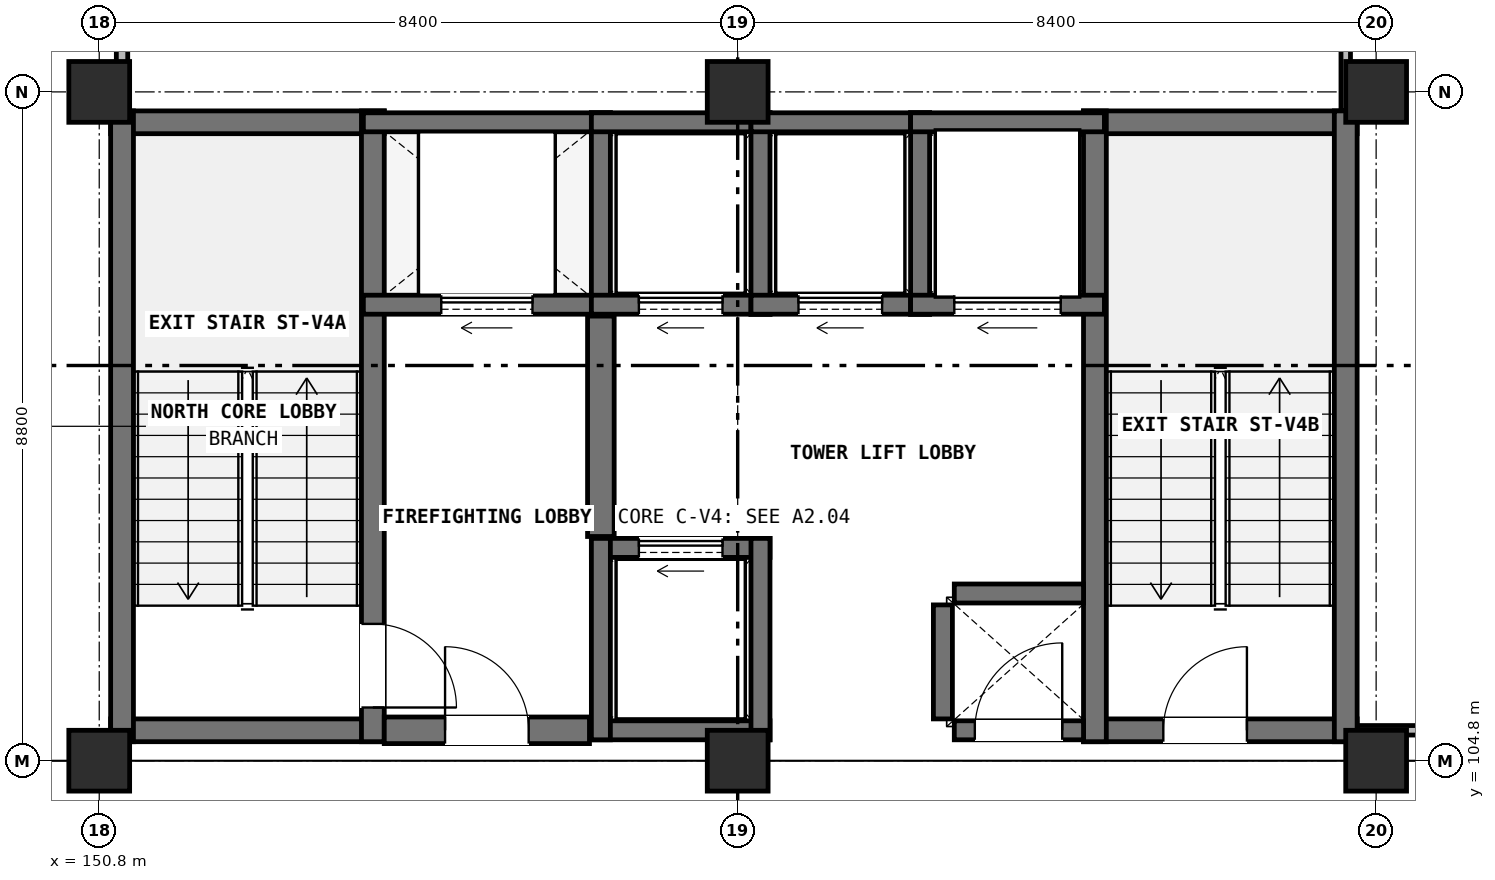
"""IFC4 building model, lengths in metres.
Left out: names, types, materials, properties, quantities, classifications, styles, units other than length and angle.
Written with IfcOpenShell. Run it as: python <this file> out.ifc"""

import sys

from ifc_helpers import new_model, si_unit, direction, frame, frame_2d, origin, origin_2d, place, context, subcontext, project, spatial, rectangle, extrude, element, fill, save


model = new_model("IFC4")
c1 = context("Model", 3, precision=1e-05, world=origin(), true_north=direction((0.0, 1.0)))
c2 = subcontext(c1, "Body", "Model", "MODEL_VIEW")
j1 = project(units=[si_unit("LENGTHUNIT", "METRE"), si_unit("PLANEANGLEUNIT", "RADIAN")], contexts=[c1])
p1 = place(None, origin())
s1 = spatial("IfcSite", under=j1, at=p1, CompositionType="ELEMENT")
p2 = place(p1, origin())
s2 = spatial("IfcBuilding", under=s1, at=p2, CompositionType="ELEMENT")
p3 = place(p2, frame((0.0, 0.0, 13.2)))
s3 = spatial("IfcBuildingStorey", under=s2, at=p3, CompositionType="ELEMENT", Elevation=13.2)
for number, where, z_axis, x_axis in (
    (1, (150.8, 104.8, 0.0), (0.0, 0.0, 1.0), (1.0, 0.0, 0.0)),
    (2, (150.8, 113.6, 0.0), (0.0, 0.0, 1.0), (1.0, 0.0, 0.0)),
    (3, (159.2, 104.8, 0.0), (0.0, 0.0, 1.0), (1.0, 0.0, 0.0)),
    (4, (159.2, 113.6, 0.0), (0.0, 0.0, 1.0), (1.0, 0.0, 0.0)),
    (5, (167.6, 104.8, 0.0), (0.0, 0.0, 1.0), (1.0, 0.0, 0.0)),
    (6, (167.6, 113.6, 0.0), (0.0, 0.0, 1.0), (1.0, 0.0, 0.0)),
):
    element("IfcColumn", number, at=place(p3, frame(where, z_axis=z_axis, x_axis=x_axis)), inside=s3, PredefinedType="COLUMN", context=c2, shape_type="SweptSolid", body=[
        extrude(rectangle(XDim=0.8, YDim=0.8, at=origin_2d()), origin(), (0.0, 0.0, 1.0), 4.0),
    ])
for number, where, z_axis, x_axis in (
    (7, (150.95, 105.2, 0.0), (0.0, 0.0, 1.0), (1.0, 0.0, 0.0)),
    (8, (150.95, 113.2, 0.0), (0.0, 0.0, 1.0), (1.0, 0.0, 0.0)),
):
    element("IfcWall", number, at=place(p3, frame(where, z_axis=z_axis, x_axis=x_axis)), inside=s3, PredefinedType="SHEAR", context=c2, shape_type="SweptSolid", body=[
        extrude(rectangle(XDim=3.6, YDim=0.3, at=frame_2d((1.8, 0.0))), origin(), (0.0, 0.0, 1.0), 4.0),
    ])
p4 = place(p3, frame((151.1, 105.05, 0.0), z_axis=(0.0, 0.0, 1.0), x_axis=(0.0, 1.0, 0.0)))
e9 = element("IfcWall", 9, at=p4, inside=s3, PredefinedType="SHEAR", context=c2, shape_type="SweptSolid", body=[
    extrude(rectangle(XDim=8.3, YDim=0.3, at=frame_2d((4.15, 0.0))), origin(), (0.0, 0.0, 1.0), 4.0),
])
p5 = place(p3, frame((154.4, 105.05, 0.0), z_axis=(0.0, 0.0, 1.0), x_axis=(0.0, 1.0, 0.0)))
e10 = element("IfcWall", 10, at=p5, inside=s3, PredefinedType="SHEAR", context=c2, shape_type="SweptSolid", body=[
    extrude(rectangle(XDim=8.3, YDim=0.3, at=frame_2d((4.15, 0.0))), origin(), (0.0, 0.0, 1.0), 4.0),
])
p6 = place(p5, frame((0.45, 0.0, 0.0)))
e11 = element("IfcOpeningElement", 11, at=p6, cuts=e10, PredefinedType="OPENING", context=c2, shape_type="SweptSolid", body=[
    extrude(rectangle(XDim=1.1, YDim=2.2, at=frame_2d((0.55, 1.1))), frame((0.0, 0.16, 0.0), z_axis=(0.0, -1.0, 0.0), x_axis=(1.0, 0.0, 0.0)), (0.0, 0.0, 1.0), 0.32),
])
p7 = place(p3, frame((163.75, 105.2, 0.0), z_axis=(0.0, 0.0, 1.0), x_axis=(1.0, 0.0, 0.0)))
e12 = element("IfcWall", 12, at=p7, inside=s3, PredefinedType="SHEAR", context=c2, shape_type="SweptSolid", body=[
    extrude(rectangle(XDim=3.6, YDim=0.3, at=frame_2d((1.8, 0.0))), origin(), (0.0, 0.0, 1.0), 4.0),
])
p8 = place(p7, frame((1.05, 0.0, 0.0)))
e13 = element("IfcOpeningElement", 13, at=p8, cuts=e12, PredefinedType="OPENING", context=c2, shape_type="SweptSolid", body=[
    extrude(rectangle(XDim=1.1, YDim=2.2, at=frame_2d((0.55, 1.1))), frame((0.0, 0.16, 0.0), z_axis=(0.0, -1.0, 0.0), x_axis=(1.0, 0.0, 0.0)), (0.0, 0.0, 1.0), 0.32),
])
p9 = place(p3, frame((163.75, 113.2, 0.0), z_axis=(0.0, 0.0, 1.0), x_axis=(1.0, 0.0, 0.0)))
e14 = element("IfcWall", 14, at=p9, inside=s3, PredefinedType="SHEAR", context=c2, shape_type="SweptSolid", body=[
    extrude(rectangle(XDim=3.6, YDim=0.3, at=frame_2d((1.8, 0.0))), origin(), (0.0, 0.0, 1.0), 4.0),
])
for number, where, z_axis, x_axis in (
    (15, (163.9, 105.05, 0.0), (0.0, 0.0, 1.0), (0.0, 1.0, 0.0)),
    (16, (167.2, 105.05, 0.0), (0.0, 0.0, 1.0), (0.0, 1.0, 0.0)),
):
    element("IfcWall", number, at=place(p3, frame(where, z_axis=z_axis, x_axis=x_axis)), inside=s3, PredefinedType="SHEAR", context=c2, shape_type="SweptSolid", body=[
        extrude(rectangle(XDim=8.3, YDim=0.3, at=frame_2d((4.15, 0.0))), origin(), (0.0, 0.0, 1.0), 4.0),
    ])
p10 = place(p3, frame((154.275, 110.8, 0.0), z_axis=(0.0, 0.0, 1.0), x_axis=(1.0, 0.0, 0.0)))
e17 = element("IfcWall", 17, at=p10, inside=s3, PredefinedType="SOLIDWALL", context=c2, shape_type="SweptSolid", body=[
    extrude(rectangle(XDim=3.25, YDim=0.25, at=frame_2d((1.625, 0.0))), origin(), (0.0, 0.0, 1.0), 3.68),
])
p11 = place(p10, frame((1.025, 0.0, 0.0)))
e18 = element("IfcOpeningElement", 18, at=p11, cuts=e17, PredefinedType="OPENING", context=c2, shape_type="SweptSolid", body=[
    extrude(rectangle(XDim=1.2, YDim=2.2, at=frame_2d((0.6, 1.1))), frame((0.0, 0.135, 0.0), z_axis=(0.0, -1.0, 0.0), x_axis=(1.0, 0.0, 0.0)), (0.0, 0.0, 1.0), 0.27),
])
p12 = place(p3, frame((154.275, 113.2, 0.0), z_axis=(0.0, 0.0, 1.0), x_axis=(1.0, 0.0, 0.0)))
e19 = element("IfcWall", 19, at=p12, inside=s3, PredefinedType="SOLIDWALL", context=c2, shape_type="SweptSolid", body=[
    extrude(rectangle(XDim=3.25, YDim=0.25, at=frame_2d((1.625, 0.0))), origin(), (0.0, 0.0, 1.0), 3.68),
])
p13 = place(p3, frame((157.4, 110.675, 0.0), z_axis=(0.0, 0.0, 1.0), x_axis=(0.0, 1.0, 0.0)))
e20 = element("IfcWall", 20, at=p13, inside=s3, PredefinedType="SOLIDWALL", context=c2, shape_type="SweptSolid", body=[
    extrude(rectangle(XDim=2.65, YDim=0.25, at=frame_2d((1.325, 0.0))), origin(), (0.0, 0.0, 1.0), 3.68),
])
p14 = place(p3, frame((157.275, 110.8, 0.0), z_axis=(0.0, 0.0, 1.0), x_axis=(1.0, 0.0, 0.0)))
e21 = element("IfcWall", 21, at=p14, inside=s3, PredefinedType="SOLIDWALL", context=c2, shape_type="SweptSolid", body=[
    extrude(rectangle(XDim=2.35, YDim=0.25, at=frame_2d((1.175, 0.0))), origin(), (0.0, 0.0, 1.0), 3.68),
])
p15 = place(p14, frame((0.625, 0.0, 0.0)))
e22 = element("IfcOpeningElement", 22, at=p15, cuts=e21, PredefinedType="OPENING", context=c2, shape_type="SweptSolid", body=[
    extrude(rectangle(XDim=1.1, YDim=2.2, at=frame_2d((0.55, 1.1))), frame((0.0, 0.135, 0.0), z_axis=(0.0, -1.0, 0.0), x_axis=(1.0, 0.0, 0.0)), (0.0, 0.0, 1.0), 0.27),
])
p16 = place(p3, frame((157.275, 113.2, 0.0), z_axis=(0.0, 0.0, 1.0), x_axis=(1.0, 0.0, 0.0)))
e23 = element("IfcWall", 23, at=p16, inside=s3, PredefinedType="SOLIDWALL", context=c2, shape_type="SweptSolid", body=[
    extrude(rectangle(XDim=2.35, YDim=0.25, at=frame_2d((1.175, 0.0))), origin(), (0.0, 0.0, 1.0), 3.68),
])
p17 = place(p3, frame((159.5, 110.675, 0.0), z_axis=(0.0, 0.0, 1.0), x_axis=(0.0, 1.0, 0.0)))
e24 = element("IfcWall", 24, at=p17, inside=s3, PredefinedType="SOLIDWALL", context=c2, shape_type="SweptSolid", body=[
    extrude(rectangle(XDim=2.65, YDim=0.25, at=frame_2d((1.325, 0.0))), origin(), (0.0, 0.0, 1.0), 3.68),
])
p18 = place(p3, frame((159.375, 110.8, 0.0), z_axis=(0.0, 0.0, 1.0), x_axis=(1.0, 0.0, 0.0)))
e25 = element("IfcWall", 25, at=p18, inside=s3, PredefinedType="SOLIDWALL", context=c2, shape_type="SweptSolid", body=[
    extrude(rectangle(XDim=2.35, YDim=0.25, at=frame_2d((1.175, 0.0))), origin(), (0.0, 0.0, 1.0), 3.68),
])
p19 = place(p18, frame((0.625, 0.0, 0.0)))
e26 = element("IfcOpeningElement", 26, at=p19, cuts=e25, PredefinedType="OPENING", context=c2, shape_type="SweptSolid", body=[
    extrude(rectangle(XDim=1.1, YDim=2.2, at=frame_2d((0.55, 1.1))), frame((0.0, 0.135, 0.0), z_axis=(0.0, -1.0, 0.0), x_axis=(1.0, 0.0, 0.0)), (0.0, 0.0, 1.0), 0.27),
])
p20 = place(p3, frame((159.375, 113.2, 0.0), z_axis=(0.0, 0.0, 1.0), x_axis=(1.0, 0.0, 0.0)))
e27 = element("IfcWall", 27, at=p20, inside=s3, PredefinedType="SOLIDWALL", context=c2, shape_type="SweptSolid", body=[
    extrude(rectangle(XDim=2.35, YDim=0.25, at=frame_2d((1.175, 0.0))), origin(), (0.0, 0.0, 1.0), 3.68),
])
p21 = place(p3, frame((161.6, 110.675, 0.0), z_axis=(0.0, 0.0, 1.0), x_axis=(0.0, 1.0, 0.0)))
e28 = element("IfcWall", 28, at=p21, inside=s3, PredefinedType="SOLIDWALL", context=c2, shape_type="SweptSolid", body=[
    extrude(rectangle(XDim=2.65, YDim=0.25, at=frame_2d((1.325, 0.0))), origin(), (0.0, 0.0, 1.0), 3.68),
])
p22 = place(p3, frame((157.275, 105.2, 0.0), z_axis=(0.0, 0.0, 1.0), x_axis=(1.0, 0.0, 0.0)))
e29 = element("IfcWall", 29, at=p22, inside=s3, PredefinedType="SOLIDWALL", context=c2, shape_type="SweptSolid", body=[
    extrude(rectangle(XDim=2.35, YDim=0.25, at=frame_2d((1.175, 0.0))), origin(), (0.0, 0.0, 1.0), 3.68),
])
p23 = place(p3, frame((157.275, 107.6, 0.0), z_axis=(0.0, 0.0, 1.0), x_axis=(1.0, 0.0, 0.0)))
e30 = element("IfcWall", 30, at=p23, inside=s3, PredefinedType="SOLIDWALL", context=c2, shape_type="SweptSolid", body=[
    extrude(rectangle(XDim=2.35, YDim=0.25, at=frame_2d((1.175, 0.0))), origin(), (0.0, 0.0, 1.0), 3.68),
])
p24 = place(p23, frame((0.625, 0.0, 0.0)))
e31 = element("IfcOpeningElement", 31, at=p24, cuts=e30, PredefinedType="OPENING", context=c2, shape_type="SweptSolid", body=[
    extrude(rectangle(XDim=1.1, YDim=2.2, at=frame_2d((0.55, 1.1))), frame((0.0, 0.135, 0.0), z_axis=(0.0, -1.0, 0.0), x_axis=(1.0, 0.0, 0.0)), (0.0, 0.0, 1.0), 0.27),
])
for number, where, z_axis, x_axis in (
    (32, (157.4, 105.075, 0.0), (0.0, 0.0, 1.0), (0.0, 1.0, 0.0)),
    (33, (159.5, 105.075, 0.0), (0.0, 0.0, 1.0), (0.0, 1.0, 0.0)),
):
    element("IfcWall", number, at=place(p3, frame(where, z_axis=z_axis, x_axis=x_axis)), inside=s3, PredefinedType="SOLIDWALL", context=c2, shape_type="SweptSolid", body=[
        extrude(rectangle(XDim=2.65, YDim=0.25, at=frame_2d((1.325, 0.0))), origin(), (0.0, 0.0, 1.0), 3.68),
    ])
p25 = place(p3, frame((161.475, 110.8, 0.0), z_axis=(0.0, 0.0, 1.0), x_axis=(1.0, 0.0, 0.0)))
e34 = element("IfcWall", 34, at=p25, inside=s3, PredefinedType="SOLIDWALL", context=c2, shape_type="SweptSolid", body=[
    extrude(rectangle(XDim=2.55, YDim=0.25, at=frame_2d((1.275, 0.0))), origin(), (0.0, 0.0, 1.0), 3.68),
])
p26 = place(p25, frame((0.575, 0.0, 0.0)))
e35 = element("IfcOpeningElement", 35, at=p26, cuts=e34, PredefinedType="OPENING", context=c2, shape_type="SweptSolid", body=[
    extrude(rectangle(XDim=1.4, YDim=2.3, at=frame_2d((0.7, 1.15))), frame((0.0, 0.135, 0.0), z_axis=(0.0, -1.0, 0.0), x_axis=(1.0, 0.0, 0.0)), (0.0, 0.0, 1.0), 0.27),
])
p27 = place(p3, frame((161.475, 113.2, 0.0), z_axis=(0.0, 0.0, 1.0), x_axis=(1.0, 0.0, 0.0)))
e36 = element("IfcWall", 36, at=p27, inside=s3, PredefinedType="SOLIDWALL", context=c2, shape_type="SweptSolid", body=[
    extrude(rectangle(XDim=2.55, YDim=0.25, at=frame_2d((1.275, 0.0))), origin(), (0.0, 0.0, 1.0), 3.68),
])
p28 = place(p3, frame((157.4, 107.75, 0.0), z_axis=(0.0, 0.0, 1.0), x_axis=(0.0, 1.0, 0.0)))
e37 = element("IfcWall", 37, at=p28, inside=s3, PredefinedType="SHEAR", context=c2, shape_type="SweptSolid", body=[
    extrude(rectangle(XDim=2.9, YDim=0.35, at=frame_2d((1.45, 0.0))), origin(), (0.0, 0.0, 1.0), 3.68),
])
p29 = place(p3, frame((154.55, 105.2, 0.0), z_axis=(0.0, 0.0, 1.0), x_axis=(1.0, 0.0, 0.0)))
e38 = element("IfcWall", 38, at=p29, inside=s3, PredefinedType="SHEAR", context=c2, shape_type="SweptSolid", body=[
    extrude(rectangle(XDim=2.7, YDim=0.35, at=frame_2d((1.35, 0.0))), origin(), (0.0, 0.0, 1.0), 3.68),
])
p30 = place(p29, frame((0.8, 0.0, 0.0)))
e39 = element("IfcOpeningElement", 39, at=p30, cuts=e38, PredefinedType="OPENING", context=c2, shape_type="SweptSolid", body=[
    extrude(rectangle(XDim=1.1, YDim=2.2, at=frame_2d((0.55, 1.1))), frame((0.0, 0.185, 0.0), z_axis=(0.0, -1.0, 0.0), x_axis=(1.0, 0.0, 0.0)), (0.0, 0.0, 1.0), 0.37),
])
p31 = place(p3, frame((161.9, 105.35, 0.0), z_axis=(0.0, 0.0, 1.0), x_axis=(0.0, 1.0, 0.0)))
e40 = element("IfcWall", 40, at=p31, inside=s3, PredefinedType="SOLIDWALL", context=c2, shape_type="SweptSolid", body=[
    extrude(rectangle(XDim=1.5, YDim=0.25, at=frame_2d((0.75, 0.0))), origin(), (0.0, 0.0, 1.0), 3.68),
])
p32 = place(p3, frame((162.05, 107.0, 0.0), z_axis=(0.0, 0.0, 1.0), x_axis=(1.0, 0.0, 0.0)))
e41 = element("IfcWall", 41, at=p32, inside=s3, PredefinedType="SOLIDWALL", context=c2, shape_type="SweptSolid", body=[
    extrude(rectangle(XDim=1.7, YDim=0.25, at=frame_2d((0.85, 0.0))), origin(), (0.0, 0.0, 1.0), 3.68),
])
p33 = place(p3, frame((162.05, 105.2, 0.0), z_axis=(0.0, 0.0, 1.0), x_axis=(1.0, 0.0, 0.0)))
e42 = element("IfcWall", 42, at=p33, inside=s3, PredefinedType="SOLIDWALL", context=c2, shape_type="SweptSolid", body=[
    extrude(rectangle(XDim=1.7, YDim=0.25, at=frame_2d((0.85, 0.0))), origin(), (0.0, 0.0, 1.0), 3.68),
])
p34 = place(p33, frame((0.27, 0.0, 0.0)))
e43 = element("IfcOpeningElement", 43, at=p34, cuts=e42, PredefinedType="OPENING", context=c2, shape_type="SweptSolid", body=[
    extrude(rectangle(XDim=1.15, YDim=2.2, at=frame_2d((0.575, 1.1))), frame((0.0, 0.135, 0.0), z_axis=(0.0, -1.0, 0.0), x_axis=(1.0, 0.0, 0.0)), (0.0, 0.0, 1.0), 0.27),
])
p35 = place(p3, frame((167.355, 105.2, 0.0), z_axis=(0.0, 0.0, 1.0), x_axis=(1.0, 0.0, 0.0)))
e44 = element("IfcWall", 44, at=p35, inside=s3, PredefinedType="PARTITIONING", context=c2, shape_type="SweptSolid", body=[
    extrude(rectangle(XDim=4.245, YDim=0.125, at=frame_2d((2.123, 0.0))), origin(), (0.0, 0.0, 1.0), 3.245),
])
p36 = place(p35, frame((1.633, 0.0, 0.0)))
e45 = element("IfcOpeningElement", 45, at=p36, cuts=e44, PredefinedType="OPENING", context=c2, shape_type="SweptSolid", body=[
    extrude(rectangle(XDim=0.98, YDim=2.1, at=frame_2d((0.49, 1.05))), frame((0.0, 0.073, 0.0), z_axis=(0.0, -1.0, 0.0), x_axis=(1.0, 0.0, 0.0)), (0.0, 0.0, 1.0), 0.145),
])
p37 = place(p3, frame((151.1, 113.355, 0.0), z_axis=(0.0, 0.0, 1.0), x_axis=(0.0, 1.0, 0.0)))
e46 = element("IfcWall", 46, at=p37, inside=s3, PredefinedType="PARTITIONING", context=c2, shape_type="SweptSolid", body=[
    extrude(rectangle(XDim=6.045, YDim=0.15, at=frame_2d((3.022, 0.0))), origin(), (0.0, 0.0, 1.0), 3.245),
])
p38 = place(p37, frame((2.143, 0.0, 0.0)))
e47 = element("IfcOpeningElement", 47, at=p38, cuts=e46, PredefinedType="OPENING", context=c2, shape_type="SweptSolid", body=[
    extrude(rectangle(XDim=1.76, YDim=2.36, at=frame_2d((0.88, 1.18))), frame((0.0, 0.085, 0.0), z_axis=(0.0, -1.0, 0.0), x_axis=(1.0, 0.0, 0.0)), (0.0, 0.0, 1.0), 0.17),
])
p39 = place(p3, frame((167.2, 113.355, 0.0), z_axis=(0.0, 0.0, 1.0), x_axis=(0.0, 1.0, 0.0)))
e48 = element("IfcWall", 48, at=p39, inside=s3, PredefinedType="PARTITIONING", context=c2, shape_type="SweptSolid", body=[
    extrude(rectangle(XDim=8.645, YDim=0.125, at=frame_2d((4.323, 0.0))), origin(), (0.0, 0.0, 1.0), 3.245),
])
p40 = place(p6, frame((1.1, 0.0, 0.0), z_axis=(0.0, 0.0, 1.0), x_axis=(-1.0, 0.0, 0.0)))
e49 = element("IfcDoor", 49, at=p40, inside=s3, OperationType="SINGLE_SWING_LEFT", PredefinedType="DOOR", context=c2, shape_type="SweptSolid", body=[
    extrude(rectangle(XDim=1.1, YDim=2.2, at=frame_2d((0.55, 1.1))), frame((0.0, 0.025, 0.0), z_axis=(0.0, -1.0, 0.0), x_axis=(1.0, 0.0, 0.0)), (0.0, 0.0, 1.0), 0.05),
])
fill(e11, e49)
p41 = place(p8, origin())
e50 = element("IfcDoor", 50, at=p41, inside=s3, OperationType="SINGLE_SWING_RIGHT", PredefinedType="DOOR", context=c2, shape_type="SweptSolid", body=[
    extrude(rectangle(XDim=1.1, YDim=2.2, at=frame_2d((0.55, 1.1))), frame((0.0, 0.025, 0.0), z_axis=(0.0, -1.0, 0.0), x_axis=(1.0, 0.0, 0.0)), (0.0, 0.0, 1.0), 0.05),
])
fill(e13, e50)
p42 = place(p11, origin())
e51 = element("IfcDoor", 51, at=p42, inside=s3, OperationType="SLIDING_TO_LEFT", PredefinedType="DOOR", context=c2, shape_type="SweptSolid", body=[
    extrude(rectangle(XDim=1.2, YDim=2.2, at=frame_2d((0.6, 1.1))), frame((0.0, 0.025, 0.0), z_axis=(0.0, -1.0, 0.0), x_axis=(1.0, 0.0, 0.0)), (0.0, 0.0, 1.0), 0.05),
])
fill(e18, e51)
p43 = place(p15, origin())
e52 = element("IfcDoor", 52, at=p43, inside=s3, OperationType="SLIDING_TO_LEFT", PredefinedType="DOOR", context=c2, shape_type="SweptSolid", body=[
    extrude(rectangle(XDim=1.1, YDim=2.2, at=frame_2d((0.55, 1.1))), frame((0.0, 0.025, 0.0), z_axis=(0.0, -1.0, 0.0), x_axis=(1.0, 0.0, 0.0)), (0.0, 0.0, 1.0), 0.05),
])
fill(e22, e52)
p44 = place(p19, origin())
e53 = element("IfcDoor", 53, at=p44, inside=s3, OperationType="SLIDING_TO_LEFT", PredefinedType="DOOR", context=c2, shape_type="SweptSolid", body=[
    extrude(rectangle(XDim=1.1, YDim=2.2, at=frame_2d((0.55, 1.1))), frame((0.0, 0.025, 0.0), z_axis=(0.0, -1.0, 0.0), x_axis=(1.0, 0.0, 0.0)), (0.0, 0.0, 1.0), 0.05),
])
fill(e26, e53)
p45 = place(p24, origin())
e54 = element("IfcDoor", 54, at=p45, inside=s3, OperationType="SLIDING_TO_LEFT", PredefinedType="DOOR", context=c2, shape_type="SweptSolid", body=[
    extrude(rectangle(XDim=1.1, YDim=2.2, at=frame_2d((0.55, 1.1))), frame((0.0, 0.025, 0.0), z_axis=(0.0, -1.0, 0.0), x_axis=(1.0, 0.0, 0.0)), (0.0, 0.0, 1.0), 0.05),
])
fill(e31, e54)
p46 = place(p26, origin())
e55 = element("IfcDoor", 55, at=p46, inside=s3, OperationType="SLIDING_TO_LEFT", PredefinedType="DOOR", context=c2, shape_type="SweptSolid", body=[
    extrude(rectangle(XDim=1.4, YDim=2.3, at=frame_2d((0.7, 1.15))), frame((0.0, 0.025, 0.0), z_axis=(0.0, -1.0, 0.0), x_axis=(1.0, 0.0, 0.0)), (0.0, 0.0, 1.0), 0.05),
])
fill(e35, e55)
p47 = place(p30, origin())
e56 = element("IfcDoor", 56, at=p47, inside=s3, OperationType="SINGLE_SWING_LEFT", PredefinedType="DOOR", context=c2, shape_type="SweptSolid", body=[
    extrude(rectangle(XDim=1.1, YDim=2.2, at=frame_2d((0.55, 1.1))), frame((0.0, 0.025, 0.0), z_axis=(0.0, -1.0, 0.0), x_axis=(1.0, 0.0, 0.0)), (0.0, 0.0, 1.0), 0.05),
])
fill(e39, e56)
p48 = place(p34, origin())
e57 = element("IfcDoor", 57, at=p48, inside=s3, OperationType="SINGLE_SWING_RIGHT", PredefinedType="DOOR", context=c2, shape_type="SweptSolid", body=[
    extrude(rectangle(XDim=1.15, YDim=2.2, at=frame_2d((0.575, 1.1))), frame((0.0, 0.025, 0.0), z_axis=(0.0, -1.0, 0.0), x_axis=(1.0, 0.0, 0.0)), (0.0, 0.0, 1.0), 0.05),
])
fill(e43, e57)
save(model, sys.argv[1])
